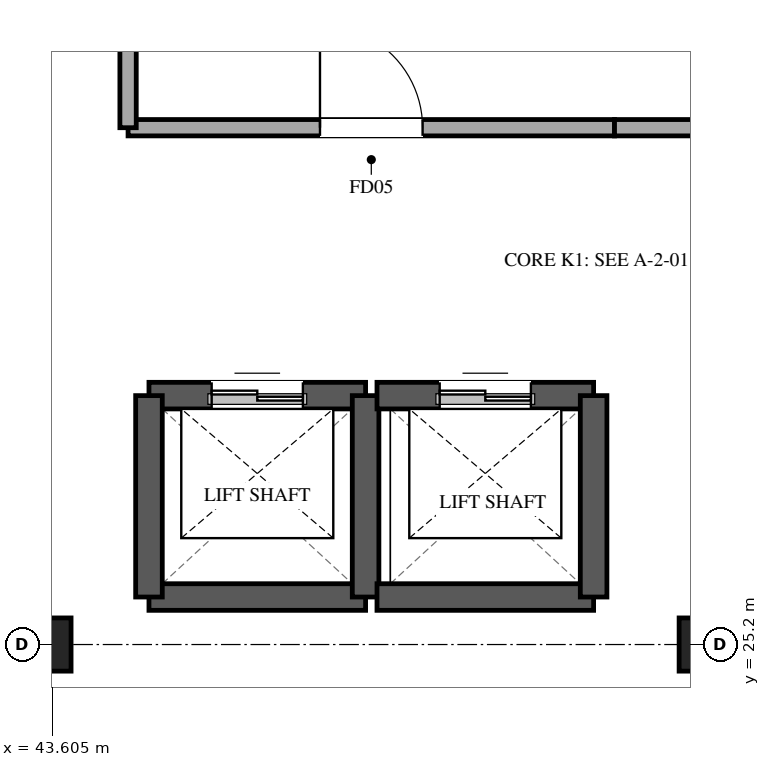
"""IFC4 building model, lengths in metres.
Left out: names, types, materials, properties, quantities, classifications, styles, units other than length and angle.
Written with IfcOpenShell. Run it as: python <this file> out.ifc"""

import sys

from ifc_helpers import new_model, si_unit, direction, frame, frame_2d, origin, origin_2d, place, context, subcontext, project, spatial, rectangle, extrude, element, fill, save


model = new_model("IFC4")
c1 = context("Model", 3, precision=1e-05, world=origin(), true_north=direction((0.0, 1.0)))
c2 = subcontext(c1, "Body", "Model", "MODEL_VIEW")
j1 = project(units=[si_unit("LENGTHUNIT", "METRE"), si_unit("PLANEANGLEUNIT", "RADIAN")], contexts=[c1])
p1 = place(None, origin())
s1 = spatial("IfcSite", under=j1, at=p1, CompositionType="ELEMENT")
p2 = place(p1, origin())
s2 = spatial("IfcBuilding", under=s1, at=p2, CompositionType="ELEMENT")
p3 = place(p2, frame((0.0, 0.0, 26.7)))
s3 = spatial("IfcBuildingStorey", under=s2, at=p3, CompositionType="ELEMENT", Elevation=26.7)
for number, where, z_axis, x_axis in (
    (1, (43.5, 25.2, 0.0), (0.0, 0.0, 1.0), (1.0, 0.0, 0.0)),
    (2, (52.2, 25.2, 0.0), (0.0, 0.0, 1.0), (1.0, 0.0, 0.0)),
):
    element("IfcColumn", number, at=place(p3, frame(where, z_axis=z_axis, x_axis=x_axis)), inside=s3, PredefinedType="COLUMN", context=c2, shape_type="SweptSolid", body=[
        extrude(rectangle(XDim=0.7, YDim=0.7, at=origin_2d()), origin(), (0.0, 0.0, 1.0), 4.8),
    ])
p4 = place(p3, frame((44.875, 28.475, 0.0), z_axis=(0.0, 0.0, 1.0), x_axis=(1.0, 0.0, 0.0)))
e3 = element("IfcWall", 3, at=p4, inside=s3, PredefinedType="SHEAR", context=c2, shape_type="SweptSolid", body=[
    extrude(rectangle(XDim=2.85, YDim=0.35, at=frame_2d((1.425, 0.0))), origin(), (0.0, 0.0, 1.0), 4.8),
])
p5 = place(p4, frame((0.825, 0.0, 0.0)))
e4 = element("IfcOpeningElement", 4, at=p5, cuts=e3, PredefinedType="OPENING", context=c2, shape_type="SweptSolid", body=[
    extrude(rectangle(XDim=1.2, YDim=2.2, at=frame_2d((0.6, 1.1))), frame((0.0, 0.185, 0.0), z_axis=(0.0, -1.0, 0.0), x_axis=(1.0, 0.0, 0.0)), (0.0, 0.0, 1.0), 0.37),
])
p6 = place(p3, frame((47.725, 25.825, 0.0), z_axis=(0.0, 0.0, 1.0), x_axis=(-1.0, 0.0, 0.0)))
e5 = element("IfcWall", 5, at=p6, inside=s3, PredefinedType="SHEAR", context=c2, shape_type="SweptSolid", body=[
    extrude(rectangle(XDim=2.85, YDim=0.35, at=frame_2d((1.425, 0.0))), origin(), (0.0, 0.0, 1.0), 4.8),
])
for number, where, z_axis, x_axis in (
    (6, (44.875, 25.825, 0.0), (0.0, 0.0, 1.0), (0.0, 1.0, 0.0)),
    (7, (47.725, 28.475, 0.0), (0.0, 0.0, 1.0), (0.0, -1.0, 0.0)),
):
    element("IfcWall", number, at=place(p3, frame(where, z_axis=z_axis, x_axis=x_axis)), inside=s3, PredefinedType="SHEAR", context=c2, shape_type="SweptSolid", body=[
        extrude(rectangle(XDim=2.65, YDim=0.35, at=frame_2d((1.325, 0.0))), origin(), (0.0, 0.0, 1.0), 4.8),
    ])
p7 = place(p3, frame((47.875, 28.475, 0.0), z_axis=(0.0, 0.0, 1.0), x_axis=(1.0, 0.0, 0.0)))
e8 = element("IfcWall", 8, at=p7, inside=s3, PredefinedType="SHEAR", context=c2, shape_type="SweptSolid", body=[
    extrude(rectangle(XDim=2.85, YDim=0.35, at=frame_2d((1.425, 0.0))), origin(), (0.0, 0.0, 1.0), 4.8),
])
p8 = place(p7, frame((0.825, 0.0, 0.0)))
e9 = element("IfcOpeningElement", 9, at=p8, cuts=e8, PredefinedType="OPENING", context=c2, shape_type="SweptSolid", body=[
    extrude(rectangle(XDim=1.2, YDim=2.2, at=frame_2d((0.6, 1.1))), frame((0.0, 0.185, 0.0), z_axis=(0.0, -1.0, 0.0), x_axis=(1.0, 0.0, 0.0)), (0.0, 0.0, 1.0), 0.37),
])
p9 = place(p3, frame((50.725, 25.825, 0.0), z_axis=(0.0, 0.0, 1.0), x_axis=(-1.0, 0.0, 0.0)))
e10 = element("IfcWall", 10, at=p9, inside=s3, PredefinedType="SHEAR", context=c2, shape_type="SweptSolid", body=[
    extrude(rectangle(XDim=2.85, YDim=0.35, at=frame_2d((1.425, 0.0))), origin(), (0.0, 0.0, 1.0), 4.8),
])
p10 = place(p3, frame((50.725, 28.475, 0.0), z_axis=(0.0, 0.0, 1.0), x_axis=(0.0, -1.0, 0.0)))
e11 = element("IfcWall", 11, at=p10, inside=s3, PredefinedType="SHEAR", context=c2, shape_type="SweptSolid", body=[
    extrude(rectangle(XDim=2.65, YDim=0.35, at=frame_2d((1.325, 0.0))), origin(), (0.0, 0.0, 1.0), 4.8),
])
p11 = place(p3, frame((44.6, 32.0, 0.0), z_axis=(0.0, 0.0, 1.0), x_axis=(1.0, 0.0, 0.0)))
e12 = element("IfcWall", 12, at=p11, inside=s3, PredefinedType="PARTITIONING", context=c2, shape_type="SweptSolid", body=[
    extrude(rectangle(XDim=6.4, YDim=0.215, at=frame_2d((3.2, 0.0))), origin(), (0.0, 0.0, 1.0), 4.46),
])
p12 = place(p11, frame((2.525, 0.0, 0.0)))
e13 = element("IfcOpeningElement", 13, at=p12, cuts=e12, PredefinedType="OPENING", context=c2, shape_type="SweptSolid", body=[
    extrude(rectangle(XDim=1.35, YDim=2.2, at=frame_2d((0.675, 1.1))), frame((0.0, 0.118, 0.0), z_axis=(0.0, -1.0, 0.0), x_axis=(1.0, 0.0, 0.0)), (0.0, 0.0, 1.0), 0.235),
])
p13 = place(p3, frame((44.6, 32.0, 0.0), z_axis=(0.0, 0.0, 1.0), x_axis=(0.0, 1.0, 0.0)))
e14 = element("IfcWall", 14, at=p13, inside=s3, PredefinedType="PARTITIONING", context=c2, shape_type="SweptSolid", body=[
    extrude(rectangle(XDim=2.98, YDim=0.215, at=frame_2d((1.49, 0.0))), origin(), (0.0, 0.0, 1.0), 3.76),
])
p14 = place(p3, frame((52.8, 32.0, 0.0), z_axis=(0.0, 0.0, 1.0), x_axis=(-1.0, 0.0, 0.0)))
e15 = element("IfcWall", 15, at=p14, inside=s3, PredefinedType="PARTITIONING", context=c2, shape_type="SweptSolid", body=[
    extrude(rectangle(XDim=1.8, YDim=0.215, at=frame_2d((0.9, 0.0))), origin(), (0.0, 0.0, 1.0), 3.76),
])
p15 = place(p5, origin())
e16 = element("IfcDoor", 16, at=p15, inside=s3, OperationType="DOUBLE_DOOR_SLIDING", PredefinedType="DOOR", context=c2, shape_type="SweptSolid", body=[
    extrude(rectangle(XDim=1.2, YDim=2.2, at=frame_2d((0.6, 1.1))), frame((0.0, 0.025, 0.0), z_axis=(0.0, -1.0, 0.0), x_axis=(1.0, 0.0, 0.0)), (0.0, 0.0, 1.0), 0.05),
])
fill(e4, e16)
p16 = place(p8, origin())
e17 = element("IfcDoor", 17, at=p16, inside=s3, OperationType="DOUBLE_DOOR_SLIDING", PredefinedType="DOOR", context=c2, shape_type="SweptSolid", body=[
    extrude(rectangle(XDim=1.2, YDim=2.2, at=frame_2d((0.6, 1.1))), frame((0.0, 0.025, 0.0), z_axis=(0.0, -1.0, 0.0), x_axis=(1.0, 0.0, 0.0)), (0.0, 0.0, 1.0), 0.05),
])
fill(e9, e17)
p17 = place(p12, origin())
e18 = element("IfcDoor", 18, at=p17, inside=s3, OperationType="SINGLE_SWING_LEFT", PredefinedType="DOOR", context=c2, shape_type="SweptSolid", body=[
    extrude(rectangle(XDim=1.35, YDim=2.2, at=frame_2d((0.675, 1.1))), frame((0.0, 0.025, 0.0), z_axis=(0.0, -1.0, 0.0), x_axis=(1.0, 0.0, 0.0)), (0.0, 0.0, 1.0), 0.05),
])
fill(e13, e18)
save(model, sys.argv[1])
